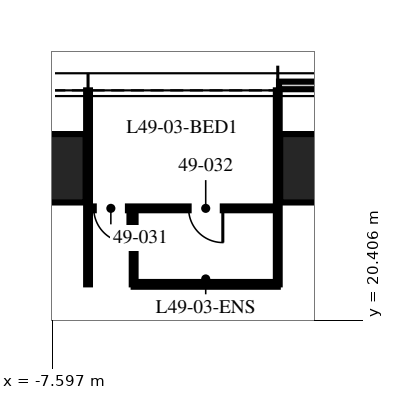
"""IFC4 building model, lengths in metres.
Left out: names, types, materials, properties, quantities, classifications, styles, units other than length and angle.
Written with IfcOpenShell. Run it as: python <this file> out.ifc"""

import sys

from ifc_helpers import new_model, si_unit, direction, frame, frame_2d, origin, origin_2d, place, context, subcontext, project, spatial, rectangle, hollow_rectangle, extrude, element, fill, save


model = new_model("IFC4")
c1 = context("Model", 3, precision=1e-05, world=origin(), true_north=direction((0.0, 1.0)))
c2 = subcontext(c1, "Body", "Model", "MODEL_VIEW")
j1 = project(units=[si_unit("LENGTHUNIT", "METRE"), si_unit("PLANEANGLEUNIT", "RADIAN")], contexts=[c1])
p1 = place(None, origin())
s1 = spatial("IfcSite", under=j1, at=p1, CompositionType="ELEMENT")
p2 = place(p1, origin())
s2 = spatial("IfcBuilding", under=s1, at=p2, CompositionType="ELEMENT")
p3 = place(p2, frame((0.0, 0.0, 199.5)))
s3 = spatial("IfcBuildingStorey", under=s2, at=p3, CompositionType="ELEMENT", Elevation=199.5)
p4 = place(p3, frame((-8.32, 24.4, -0.07), z_axis=(0.0, 0.0, 1.0), x_axis=(1.0, 0.0, 0.0)))
e1 = element("IfcColumn", 1, at=p4, inside=s3, PredefinedType="COLUMN", context=c2, shape_type="SweptSolid", body=[
    extrude(hollow_rectangle(XDim=3.2, YDim=1.8, WallThickness=0.2, at=origin_2d()), origin(), (0.0, 0.0, 1.0), 3.82),
])
p5 = place(p3, frame((0.0, 24.4, -0.23), z_axis=(0.0, 0.0, 1.0), x_axis=(1.0, 0.0, 0.0)))
e2 = element("IfcColumn", 2, at=p5, inside=s3, PredefinedType="COLUMN", context=c2, shape_type="SweptSolid", body=[
    extrude(hollow_rectangle(XDim=3.2, YDim=1.8, WallThickness=0.2, at=origin_2d()), origin(), (0.0, 0.0, 1.0), 3.98),
])
p6 = place(p3, frame((1.632, 26.58, 0.0), z_axis=(0.0, 0.0, 1.0), x_axis=(-1.0, 0.0, 0.0)))
e3 = element("IfcWall", 3, at=p6, inside=s3, PredefinedType="ELEMENTEDWALL", context=c2, shape_type="SweptSolid", body=[
    extrude(rectangle(XDim=3.263, YDim=0.2, at=frame_2d((1.632, 0.0))), origin(), (0.0, 0.0, 1.0), 3.75),
])
p7 = place(p6, frame((1.132, 0.0, 0.0)))
e4 = element("IfcOpeningElement", 4, at=p7, cuts=e3, PredefinedType="OPENING", context=c2, shape_type="SweptSolid", body=[
    extrude(rectangle(XDim=1.0, YDim=2.4, at=frame_2d((0.5, 1.2))), frame((0.0, 0.11, 0.0), z_axis=(0.0, -1.0, 0.0), x_axis=(1.0, 0.0, 0.0)), (0.0, 0.0, 1.0), 0.22),
])
for number, where, z_axis, x_axis in (
    (5, (-1.664, 21.345, 0.0), (0.0, 0.0, 1.0), (0.0, 1.0, 0.0)),
    (6, (-6.656, 21.345, 0.0), (0.0, 0.0, 1.0), (0.0, 1.0, 0.0)),
):
    element("IfcWall", number, at=place(p3, frame(where, z_axis=z_axis, x_axis=x_axis)), inside=s3, PredefinedType="PARTITIONING", context=c2, shape_type="SweptSolid", body=[
        extrude(rectangle(XDim=5.105, YDim=0.1, at=frame_2d((2.552, 0.0))), origin(), (0.0, 0.0, 1.0), 2.91),
    ])
p8 = place(p3, frame((-1.664, 23.345, 0.0), z_axis=(0.0, 0.0, 1.0), x_axis=(-1.0, 0.0, 0.0)))
e7 = element("IfcWall", 7, at=p8, inside=s3, PredefinedType="PARTITIONING", context=c2, shape_type="SweptSolid", body=[
    extrude(rectangle(XDim=4.992, YDim=0.1, at=frame_2d((2.496, 0.0))), origin(), (0.0, 0.0, 1.0), 2.81),
])
p9 = place(p8, frame((3.942, 0.0, 0.0)))
e8 = element("IfcOpeningElement", 8, at=p9, cuts=e7, PredefinedType="OPENING", context=c2, shape_type="SweptSolid", body=[
    extrude(rectangle(XDim=0.9, YDim=2.1, at=frame_2d((0.45, 1.05))), frame((0.0, 0.06, 0.0), z_axis=(0.0, -1.0, 0.0), x_axis=(1.0, 0.0, 0.0)), (0.0, 0.0, 1.0), 0.12),
])
p10 = place(p8, frame((1.446, 0.0, 0.0)))
e9 = element("IfcOpeningElement", 9, at=p10, cuts=e7, PredefinedType="OPENING", context=c2, shape_type="SweptSolid", body=[
    extrude(rectangle(XDim=0.9, YDim=2.1, at=frame_2d((0.45, 1.05))), frame((0.0, 0.06, 0.0), z_axis=(0.0, -1.0, 0.0), x_axis=(1.0, 0.0, 0.0)), (0.0, 0.0, 1.0), 0.12),
])
p11 = place(p3, frame((-5.456, 21.345, 0.0), z_axis=(0.0, 0.0, 1.0), x_axis=(0.0, 1.0, 0.0)))
e10 = element("IfcWall", 10, at=p11, inside=s3, PredefinedType="PARTITIONING", context=c2, shape_type="SweptSolid", body=[
    extrude(rectangle(XDim=2.0, YDim=0.1, at=frame_2d((1.0, 0.0))), origin(), (0.0, 0.0, 1.0), 3.5),
])
p12 = place(p3, frame((-1.664, 21.345, 0.0), z_axis=(0.0, 0.0, 1.0), x_axis=(-1.0, 0.0, 0.0)))
e11 = element("IfcWall", 11, at=p12, inside=s3, PredefinedType="PARTITIONING", context=c2, shape_type="SweptSolid", body=[
    extrude(rectangle(XDim=3.792, YDim=0.125, at=frame_2d((1.896, 0.0))), origin(), (0.0, 0.0, 1.0), 2.81),
])
p13 = place(p9, origin())
e12 = element("IfcDoor", 12, at=p13, inside=s3, OperationType="SINGLE_SWING_LEFT", PredefinedType="DOOR", context=c2, shape_type="SweptSolid", body=[
    extrude(rectangle(XDim=0.9, YDim=2.1, at=frame_2d((0.45, 1.05))), frame((0.0, 0.025, 0.0), z_axis=(0.0, -1.0, 0.0), x_axis=(1.0, 0.0, 0.0)), (0.0, 0.0, 1.0), 0.05),
])
fill(e8, e12)
p14 = place(p10, origin())
e13 = element("IfcDoor", 13, at=p14, inside=s3, OperationType="SINGLE_SWING_LEFT", PredefinedType="DOOR", context=c2, shape_type="SweptSolid", body=[
    extrude(rectangle(XDim=0.9, YDim=2.1, at=frame_2d((0.45, 1.05))), frame((0.0, 0.025, 0.0), z_axis=(0.0, -1.0, 0.0), x_axis=(1.0, 0.0, 0.0)), (0.0, 0.0, 1.0), 0.05),
])
fill(e9, e13)
save(model, sys.argv[1])
